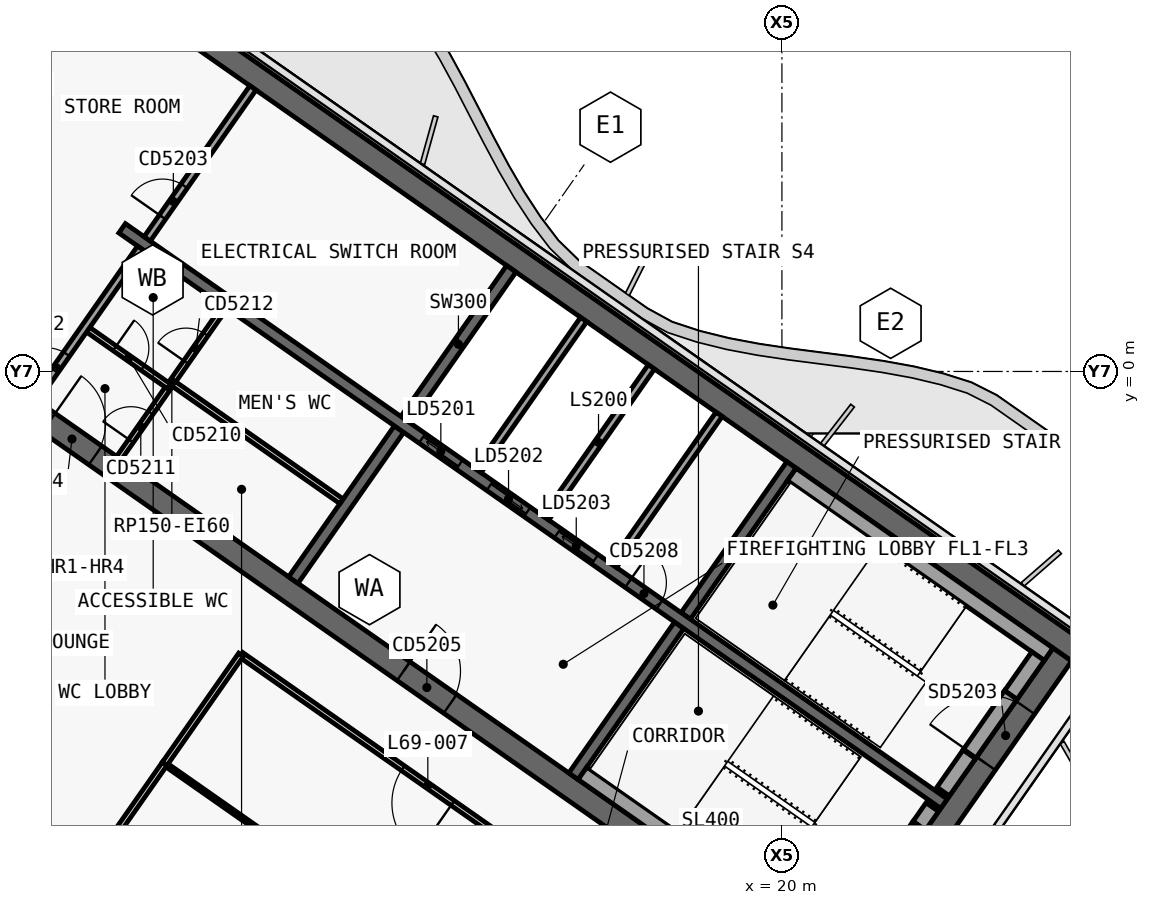
"""IFC4 building model, lengths in metres.
Left out: names, types, materials, properties, quantities, classifications, styles, units other than length and angle.
Written with IfcOpenShell. Run it as: python <this file> out.ifc"""

import sys

from ifc_helpers import new_model, si_unit, direction, frame, frame_2d, origin, place, context, subcontext, project, spatial, polyline, rectangle, outline, extrude, element, fill, save


model = new_model("IFC4")
c1 = context("Model", 3, precision=1e-05, world=origin(), true_north=direction((0.0, 1.0)))
c2 = subcontext(c1, "Body", "Model", "MODEL_VIEW")
j1 = project(units=[si_unit("LENGTHUNIT", "METRE"), si_unit("PLANEANGLEUNIT", "RADIAN")], contexts=[c1])
p1 = place(None, origin())
s1 = spatial("IfcSite", under=j1, at=p1, CompositionType="ELEMENT")
p2 = place(p1, origin())
s2 = spatial("IfcBuilding", under=s1, at=p2, CompositionType="ELEMENT")
p3 = place(p2, frame((0.0, 0.0, 291.7)))
s3 = spatial("IfcBuildingStorey", under=s2, at=p3, CompositionType="ELEMENT", Elevation=291.7)
p4 = place(p3, frame((0.028, 12.066, 0.0), z_axis=(0.0, 0.0, 1.0), x_axis=(0.819151382952, -0.573577380837, 0.0)))
e1 = element("IfcWall", 1, at=p4, inside=s3, PredefinedType="SHEAR", context=c2, shape_type="SweptSolid", body=[
    extrude(outline(polyline([(33.898, 0.3), (0.0, 0.3), (0.42, -0.3), (33.898, -0.3), (33.898, 0.3)])), origin(), (0.0, 0.0, 1.0), 3.9),
])
p5 = place(p3, frame((0.028, -0.874, 0.0), z_axis=(0.0, 0.0, 1.0), x_axis=(0.819150035022, -0.573579305871, 0.0)))
e2 = element("IfcWall", 2, at=p5, inside=s3, PredefinedType="SHEAR", context=c2, shape_type="SweptSolid", body=[
    extrude(outline(polyline([(26.476, 0.3), (0.0, 0.3), (0.42, -0.3), (26.476, -0.3), (26.476, 0.3)])), origin(), (0.0, 0.0, 1.0), 3.9),
])
p6 = place(p5, frame((0.826, 0.0, 0.0)))
e3 = element("IfcOpeningElement", 3, at=p6, cuts=e2, PredefinedType="OPENING", context=c2, shape_type="SweptSolid", body=[
    extrude(rectangle(XDim=1.5, YDim=2.1, at=frame_2d((0.75, 1.05))), frame((0.0, 0.31, 0.0), z_axis=(0.0, -1.0, 0.0), x_axis=(1.0, 0.0, 0.0)), (0.0, 0.0, 1.0), 0.62),
])
p7 = place(p5, frame((12.226, 0.0, 0.0)))
e4 = element("IfcOpeningElement", 4, at=p7, cuts=e2, PredefinedType="OPENING", context=c2, shape_type="SweptSolid", body=[
    extrude(rectangle(XDim=1.5, YDim=2.1, at=frame_2d((0.75, 1.05))), frame((0.0, 0.31, 0.0), z_axis=(0.0, -1.0, 0.0), x_axis=(1.0, 0.0, 0.0)), (0.0, 0.0, 1.0), 0.62),
])
p8 = place(p3, frame((21.642, -15.642, 0.0), z_axis=(0.0, 0.0, 1.0), x_axis=(0.573586866468, 0.819144740944, 0.0)))
e5 = element("IfcWall", 5, at=p8, inside=s3, PredefinedType="SHEAR", context=c2, shape_type="SweptSolid", body=[
    extrude(outline(polyline([(10.0, 0.3), (0.0, 0.3), (0.0, -0.3), (10.0, -0.3), (10.0, 0.3)])), origin(), (0.0, 0.0, 1.0), 3.9),
])
p9 = place(p8, frame((6.5, 0.0, 0.0)))
e6 = element("IfcOpeningElement", 6, at=p9, cuts=e5, PredefinedType="OPENING", context=c2, shape_type="SweptSolid", body=[
    extrude(rectangle(XDim=1.8, YDim=2.1, at=frame_2d((0.9, 1.05))), frame((0.0, 0.31, 0.0), z_axis=(0.0, -1.0, 0.0), x_axis=(1.0, 0.0, 0.0)), (0.0, 0.0, 1.0), 0.62),
])
p10 = place(p8, frame((2.3, 0.0, 0.0)))
e7 = element("IfcOpeningElement", 7, at=p10, cuts=e5, PredefinedType="OPENING", context=c2, shape_type="SweptSolid", body=[
    extrude(rectangle(XDim=1.8, YDim=2.1, at=frame_2d((0.9, 1.05))), frame((0.0, 0.31, 0.0), z_axis=(0.0, -1.0, 0.0), x_axis=(1.0, 0.0, 0.0)), (0.0, 0.0, 1.0), 0.62),
])
p11 = place(p3, frame((7.143, -5.49, 0.0), z_axis=(0.0, 0.0, 1.0), x_axis=(0.573617744349, 0.819123118565, 0.0)))
e8 = element("IfcWall", 8, at=p11, inside=s3, PredefinedType="SHEAR", context=c2, shape_type="SweptSolid", body=[
    extrude(outline(polyline([(0.0, 0.15), (0.0, -0.15), (4.85, -0.15), (4.85, 0.15), (0.0, 0.15)])), origin(), (0.0, 0.0, 1.0), 3.9),
])
p12 = place(p3, frame((10.097, -1.271, 0.0), z_axis=(0.0, 0.0, 1.0), x_axis=(0.573560315113, 0.819163332265, 0.0)))
e9 = element("IfcWall", 9, at=p12, inside=s3, PredefinedType="SHEAR", context=c2, shape_type="SweptSolid", body=[
    extrude(outline(polyline([(4.85, -0.15), (4.85, 0.15), (0.0, 0.15), (0.0, -0.15), (4.85, -0.15)])), origin(), (0.0, 0.0, 1.0), 3.9),
])
p13 = place(p3, frame((14.515, -10.652, 0.0), z_axis=(0.0, 0.0, 1.0), x_axis=(0.573560315113, 0.819163332265, 0.0)))
e10 = element("IfcWall", 10, at=p13, inside=s3, PredefinedType="SHEAR", context=c2, shape_type="SweptSolid", body=[
    extrude(outline(polyline([(0.0, 0.15), (0.0, -0.15), (4.85, -0.15), (4.85, 0.15), (0.0, 0.15)])), origin(), (0.0, 0.0, 1.0), 3.9),
])
p14 = place(p3, frame((17.469, -6.433, 0.0), z_axis=(0.0, 0.0, 1.0), x_axis=(0.573594092424, 0.81913968109, 0.0)))
e11 = element("IfcWall", 11, at=p14, inside=s3, PredefinedType="SHEAR", context=c2, shape_type="SweptSolid", body=[
    extrude(outline(polyline([(4.85, -0.15), (4.85, 0.15), (0.0, 0.15), (0.0, -0.15), (4.85, -0.15)])), origin(), (0.0, 0.0, 1.0), 3.9),
])
p15 = place(p3, frame((2.638, 3.768, 0.0), z_axis=(0.0, 0.0, 1.0), x_axis=(0.819155014212, -0.573572194837, 0.0)))
e12 = element("IfcWall", 12, at=p15, inside=s3, PredefinedType="SHEAR", context=c2, shape_type="SweptSolid", body=[
    extrude(outline(polyline([(0.0, 0.15), (0.0, -0.15), (26.4, -0.15), (26.4, 0.15), (0.0, 0.15)])), origin(), (0.0, 0.0, 1.0), 3.9),
])
p16 = place(p15, frame((9.637, 0.0, 0.0)))
e13 = element("IfcOpeningElement", 13, at=p16, cuts=e12, PredefinedType="OPENING", context=c2, shape_type="SweptSolid", body=[
    extrude(rectangle(XDim=1.2, YDim=2.1, at=frame_2d((0.6, 1.05))), frame((0.0, 0.16, 0.0), z_axis=(0.0, -1.0, 0.0), x_axis=(1.0, 0.0, 0.0)), (0.0, 0.0, 1.0), 0.32),
])
p17 = place(p15, frame((11.812, 0.0, 0.0)))
e14 = element("IfcOpeningElement", 14, at=p17, cuts=e12, PredefinedType="OPENING", context=c2, shape_type="SweptSolid", body=[
    extrude(rectangle(XDim=1.2, YDim=2.1, at=frame_2d((0.6, 1.05))), frame((0.0, 0.16, 0.0), z_axis=(0.0, -1.0, 0.0), x_axis=(1.0, 0.0, 0.0)), (0.0, 0.0, 1.0), 0.32),
])
p18 = place(p15, frame((13.988, 0.0, 0.0)))
e15 = element("IfcOpeningElement", 15, at=p18, cuts=e12, PredefinedType="OPENING", context=c2, shape_type="SweptSolid", body=[
    extrude(rectangle(XDim=1.2, YDim=2.1, at=frame_2d((0.6, 1.05))), frame((0.0, 0.16, 0.0), z_axis=(0.0, -1.0, 0.0), x_axis=(1.0, 0.0, 0.0)), (0.0, 0.0, 1.0), 0.32),
])
p19 = place(p15, frame((16.262, 0.0, 0.0)))
e16 = element("IfcOpeningElement", 16, at=p19, cuts=e12, PredefinedType="OPENING", context=c2, shape_type="SweptSolid", body=[
    extrude(rectangle(XDim=1.0, YDim=2.1, at=frame_2d((0.5, 1.05))), frame((0.0, 0.16, 0.0), z_axis=(0.0, -1.0, 0.0), x_axis=(1.0, 0.0, 0.0)), (0.0, 0.0, 1.0), 0.32),
])
p20 = place(p3, frame((12.001, -2.605, 0.0), z_axis=(0.0, 0.0, 1.0), x_axis=(0.573560315113, 0.819163332265, 0.0)))
e17 = element("IfcWall", 17, at=p20, inside=s3, PredefinedType="SOLIDWALL", context=c2, shape_type="SweptSolid", body=[
    extrude(rectangle(XDim=4.85, YDim=0.2, at=frame_2d((2.425, 0.0))), origin(), (0.0, 0.0, 1.0), 3.9),
])
p21 = place(p3, frame((13.783, -3.852, 0.0), z_axis=(0.0, 0.0, 1.0), x_axis=(0.573594092424, 0.81913968109, 0.0)))
e18 = element("IfcWall", 18, at=p21, inside=s3, PredefinedType="SOLIDWALL", context=c2, shape_type="SweptSolid", body=[
    extrude(rectangle(XDim=4.85, YDim=0.2, at=frame_2d((2.425, 0.0))), origin(), (0.0, 0.0, 1.0), 3.9),
])
p22 = place(p3, frame((15.565, -5.1, 0.0), z_axis=(0.0, 0.0, 1.0), x_axis=(0.573560315113, 0.819163332265, 0.0)))
e19 = element("IfcWall", 19, at=p22, inside=s3, PredefinedType="SOLIDWALL", context=c2, shape_type="SweptSolid", body=[
    extrude(rectangle(XDim=4.85, YDim=0.2, at=frame_2d((2.425, 0.0))), origin(), (0.0, 0.0, 1.0), 3.9),
])
p23 = place(p3, frame((2.556, -2.278, 0.0), z_axis=(0.0, 0.0, 1.0), x_axis=(0.573560315113, 0.819163332265, 0.0)))
e20 = element("IfcWall", 20, at=p23, inside=s3, PredefinedType="PARTITIONING", context=c2, shape_type="SweptSolid", body=[
    extrude(rectangle(XDim=4.85, YDim=0.15, at=frame_2d((2.425, 0.0))), origin(), (0.0, 0.0, 1.0), 3.62),
])
p24 = place(p23, frame((0.55, 0.0, 0.0)))
e21 = element("IfcOpeningElement", 21, at=p24, cuts=e20, PredefinedType="OPENING", context=c2, shape_type="SweptSolid", body=[
    extrude(rectangle(XDim=0.9, YDim=2.1, at=frame_2d((0.45, 1.05))), frame((0.0, 0.085, 0.0), z_axis=(0.0, -1.0, 0.0), x_axis=(1.0, 0.0, 0.0)), (0.0, 0.0, 1.0), 0.17),
])
p25 = place(p23, frame((3.075, 0.0, 0.0)))
e22 = element("IfcOpeningElement", 22, at=p25, cuts=e20, PredefinedType="OPENING", context=c2, shape_type="SweptSolid", body=[
    extrude(rectangle(XDim=0.9, YDim=2.1, at=frame_2d((0.45, 1.05))), frame((0.0, 0.085, 0.0), z_axis=(0.0, -1.0, 0.0), x_axis=(1.0, 0.0, 0.0)), (0.0, 0.0, 1.0), 0.17),
])
p26 = place(p3, frame((1.745, 1.097, 0.0), z_axis=(0.0, 0.0, 1.0), x_axis=(0.819178980414, -0.573537965655, 0.0)))
e23 = element("IfcWall", 23, at=p26, inside=s3, PredefinedType="PARTITIONING", context=c2, shape_type="SweptSolid", body=[
    extrude(rectangle(XDim=2.6, YDim=0.15, at=frame_2d((1.3, 0.0))), origin(), (0.0, 0.0, 1.0), 3.62),
])
p27 = place(p26, frame((0.85, 0.0, 0.0)))
e24 = element("IfcOpeningElement", 24, at=p27, cuts=e23, PredefinedType="OPENING", context=c2, shape_type="SweptSolid", body=[
    extrude(rectangle(XDim=0.9, YDim=2.1, at=frame_2d((0.45, 1.05))), frame((0.0, 0.085, 0.0), z_axis=(0.0, -1.0, 0.0), x_axis=(1.0, 0.0, 0.0)), (0.0, 0.0, 1.0), 0.17),
])
p28 = place(p3, frame((3.947, -0.292, 0.0), z_axis=(0.0, 0.0, 1.0), x_axis=(0.819151939971, -0.573576585332, 0.0)))
e25 = element("IfcWall", 25, at=p28, inside=s3, PredefinedType="PARTITIONING", context=c2, shape_type="SweptSolid", body=[
    extrude(rectangle(XDim=5.45, YDim=0.15, at=frame_2d((2.725, 0.0))), origin(), (0.0, 0.0, 1.0), 3.62),
])
p29 = place(p3, frame((20.259, -2.71, 0.0), z_axis=(0.0, 0.0, 1.0), x_axis=(0.81914849389, -0.573581506813, 0.0)))
e26 = element("IfcWall", 26, at=p29, inside=s3, PredefinedType="SOLIDWALL", context=c2, shape_type="SweptSolid", body=[
    extrude(rectangle(XDim=8.25, YDim=0.4, at=frame_2d((4.125, 0.0))), origin(), (0.0, 0.0, 1.0), 3.62),
])
p30 = place(p3, frame((24.244, -11.055, 0.0), z_axis=(0.0, 0.0, 1.0), x_axis=(0.573571582932, 0.819155442668, 0.0)))
e27 = element("IfcWall", 27, at=p30, inside=s3, PredefinedType="SOLIDWALL", context=c2, shape_type="SweptSolid", body=[
    extrude(rectangle(XDim=1.2, YDim=0.4, at=frame_2d((0.6, 0.0))), origin(), (0.0, 0.0, 1.0), 3.62),
])
p31 = place(p3, frame((26.022, -8.515, 0.0), z_axis=(0.0, 0.0, 1.0), x_axis=(0.573619628835, 0.819121798889, 0.0)))
e28 = element("IfcWall", 28, at=p31, inside=s3, PredefinedType="SOLIDWALL", context=c2, shape_type="SweptSolid", body=[
    extrude(rectangle(XDim=1.25, YDim=0.4, at=frame_2d((0.625, 0.0))), origin(), (0.0, 0.0, 1.0), 3.62),
])
p32 = place(p3, frame((24.932, -10.072, 2.15), z_axis=(0.0, 0.0, 1.0), x_axis=(0.573591692345, 0.819141361715, 0.0)))
e29 = element("IfcWall", 29, at=p32, inside=s3, PredefinedType="SOLIDWALL", context=c2, shape_type="SweptSolid", body=[
    extrude(rectangle(XDim=1.9, YDim=0.4, at=frame_2d((0.95, 0.0))), origin(), (0.0, 0.0, 1.0), 1.47),
])
p33 = place(p3, frame((14.753, -10.574, 0.0), z_axis=(0.0, 0.0, 1.0), x_axis=(0.819158229677, -0.573567602601, 0.0)))
e30 = element("IfcWall", 30, at=p33, inside=s3, PredefinedType="SOLIDWALL", context=c2, shape_type="SweptSolid", body=[
    extrude(rectangle(XDim=8.25, YDim=0.4, at=frame_2d((4.125, 0.0))), origin(), (0.0, 0.0, 1.0), 3.62),
])
p34 = place(p3, frame((23.613, -11.956, 0.0), z_axis=(0.0, 0.0, 1.0), x_axis=(0.573435029941, 0.819251039936, 0.0)))
e31 = element("IfcWall", 31, at=p34, inside=s3, PredefinedType="SOLIDWALL", context=c2, shape_type="SweptSolid", body=[
    extrude(rectangle(XDim=0.6, YDim=0.4, at=frame_2d((0.3, 0.0))), origin(), (0.0, 0.0, 1.0), 3.62),
])
p35 = place(p3, frame((22.523, -13.512, 2.15), z_axis=(0.0, 0.0, 1.0), x_axis=(0.573591692345, 0.819141361715, 0.0)))
e32 = element("IfcWall", 32, at=p35, inside=s3, PredefinedType="SOLIDWALL", context=c2, shape_type="SweptSolid", body=[
    extrude(rectangle(XDim=1.9, YDim=0.4, at=frame_2d((0.95, 0.0))), origin(), (0.0, 0.0, 1.0), 1.47),
])
p36 = place(p3, frame((0.344, -0.729, 0.0), z_axis=(0.0, 0.0, 1.0), x_axis=(0.573560315113, 0.819163332265, 0.0)))
e33 = element("IfcWall", 33, at=p36, inside=s3, PredefinedType="SOLIDWALL", context=c2, shape_type="SweptSolid", body=[
    extrude(rectangle(XDim=4.85, YDim=0.2, at=frame_2d((2.425, 0.0))), origin(), (0.0, 0.0, 1.0), 3.62),
])
p37 = place(p36, frame((0.55, 0.0, 0.0)))
e34 = element("IfcOpeningElement", 34, at=p37, cuts=e33, PredefinedType="OPENING", context=c2, shape_type="SweptSolid", body=[
    extrude(rectangle(XDim=0.9, YDim=2.1, at=frame_2d((0.45, 1.05))), frame((0.0, 0.11, 0.0), z_axis=(0.0, -1.0, 0.0), x_axis=(1.0, 0.0, 0.0)), (0.0, 0.0, 1.0), 0.22),
])
p38 = place(p3, frame((3.298, 3.49, 0.0), z_axis=(0.0, 0.0, 1.0), x_axis=(0.573560315113, 0.819163332265, 0.0)))
e35 = element("IfcWall", 35, at=p38, inside=s3, PredefinedType="SOLIDWALL", context=c2, shape_type="SweptSolid", body=[
    extrude(rectangle(XDim=4.85, YDim=0.2, at=frame_2d((2.425, 0.0))), origin(), (0.0, 0.0, 1.0), 3.62),
])
p39 = place(p38, frame((0.7, 0.0, 0.0)))
e36 = element("IfcOpeningElement", 36, at=p39, cuts=e35, PredefinedType="OPENING", context=c2, shape_type="SweptSolid", body=[
    extrude(rectangle(XDim=1.0, YDim=2.1, at=frame_2d((0.5, 1.05))), frame((0.0, 0.11, 0.0), z_axis=(0.0, -1.0, 0.0), x_axis=(1.0, 0.0, 0.0)), (0.0, 0.0, 1.0), 0.22),
])
p40 = place(p3, frame((15.598, -14.34, 0.0), z_axis=(0.0, 0.0, 1.0), x_axis=(-0.81915546166, 0.573571555809, 0.0)))
e37 = element("IfcWall", 37, at=p40, inside=s3, PredefinedType="PARTITIONING", context=c2, shape_type="SweptSolid", body=[
    extrude(rectangle(XDim=12.002, YDim=0.15, at=frame_2d((6.001, 0.0))), origin(), (0.0, 0.0, 1.0), 3.05),
])
p41 = place(p40, frame((5.201, 0.0, 0.0)))
e38 = element("IfcOpeningElement", 38, at=p41, cuts=e37, PredefinedType="OPENING", context=c2, shape_type="SweptSolid", body=[
    extrude(rectangle(XDim=1.6, YDim=2.1, at=frame_2d((0.8, 1.05))), frame((0.0, 0.085, 0.0), z_axis=(0.0, -1.0, 0.0), x_axis=(1.0, 0.0, 0.0)), (0.0, 0.0, 1.0), 0.17),
])
p42 = place(p3, frame((13.588, -17.207, 0.0), z_axis=(0.0, 0.0, 1.0), x_axis=(-0.819156404271, 0.573570209602, 0.0)))
e39 = element("IfcWall", 39, at=p42, inside=s3, PredefinedType="PARTITIONING", context=c2, shape_type="SweptSolid", body=[
    extrude(rectangle(XDim=12.0, YDim=0.1, at=frame_2d((6.0, 0.0))), origin(), (0.0, 0.0, 1.0), 3.05),
])
p43 = place(p42, frame((5.55, 0.0, 0.0)))
e40 = element("IfcOpeningElement", 40, at=p43, cuts=e39, PredefinedType="OPENING", context=c2, shape_type="SweptSolid", body=[
    extrude(rectangle(XDim=0.9, YDim=2.1, at=frame_2d((0.45, 1.05))), frame((0.0, 0.06, 0.0), z_axis=(0.0, -1.0, 0.0), x_axis=(1.0, 0.0, 0.0)), (0.0, 0.0, 1.0), 0.12),
])
p44 = place(p3, frame((1.849, -13.051, 0.0), z_axis=(0.0, 0.0, 1.0), x_axis=(0.573595235521, 0.819138880647, 0.0)))
e41 = element("IfcWall", 41, at=p44, inside=s3, PredefinedType="PARTITIONING", context=c2, shape_type="SweptSolid", body=[
    extrude(rectangle(XDim=3.329, YDim=0.15, at=frame_2d((1.665, 0.0))), origin(), (0.0, 0.0, 1.0), 3.05),
])
p45 = place(p3, frame((3.759, -10.323, 0.0), z_axis=(0.0, 0.0, 1.0), x_axis=(0.573598101901, 0.81913687348, 0.0)))
e42 = element("IfcWall", 42, at=p45, inside=s3, PredefinedType="PARTITIONING", context=c2, shape_type="SweptSolid", body=[
    extrude(rectangle(XDim=3.5, YDim=0.15, at=frame_2d((1.75, 0.0))), origin(), (0.0, 0.0, 1.0), 3.05),
])
p46 = place(p16, origin())
e43 = element("IfcDoor", 43, at=p46, inside=s3, OperationType="SLIDING_TO_LEFT", PredefinedType="DOOR", context=c2, shape_type="SweptSolid", body=[
    extrude(rectangle(XDim=1.2, YDim=2.1, at=frame_2d((0.6, 1.05))), frame((0.0, 0.025, 0.0), z_axis=(0.0, -1.0, 0.0), x_axis=(1.0, 0.0, 0.0)), (0.0, 0.0, 1.0), 0.05),
])
fill(e13, e43)
p47 = place(p17, origin())
e44 = element("IfcDoor", 44, at=p47, inside=s3, OperationType="SLIDING_TO_RIGHT", PredefinedType="DOOR", context=c2, shape_type="SweptSolid", body=[
    extrude(rectangle(XDim=1.2, YDim=2.1, at=frame_2d((0.6, 1.05))), frame((0.0, 0.025, 0.0), z_axis=(0.0, -1.0, 0.0), x_axis=(1.0, 0.0, 0.0)), (0.0, 0.0, 1.0), 0.05),
])
fill(e14, e44)
p48 = place(p18, origin())
e45 = element("IfcDoor", 45, at=p48, inside=s3, OperationType="SLIDING_TO_LEFT", PredefinedType="DOOR", context=c2, shape_type="SweptSolid", body=[
    extrude(rectangle(XDim=1.2, YDim=2.1, at=frame_2d((0.6, 1.05))), frame((0.0, 0.025, 0.0), z_axis=(0.0, -1.0, 0.0), x_axis=(1.0, 0.0, 0.0)), (0.0, 0.0, 1.0), 0.05),
])
fill(e15, e45)
p49 = place(p19, origin())
e46 = element("IfcDoor", 46, at=p49, inside=s3, OperationType="SINGLE_SWING_RIGHT", PredefinedType="DOOR", context=c2, shape_type="SweptSolid", body=[
    extrude(rectangle(XDim=1.0, YDim=2.1, at=frame_2d((0.5, 1.05))), frame((0.0, 0.025, 0.0), z_axis=(0.0, -1.0, 0.0), x_axis=(1.0, 0.0, 0.0)), (0.0, 0.0, 1.0), 0.05),
])
fill(e16, e46)
p50 = place(p24, origin())
e47 = element("IfcDoor", 47, at=p50, inside=s3, OperationType="SINGLE_SWING_RIGHT", PredefinedType="DOOR", context=c2, shape_type="SweptSolid", body=[
    extrude(rectangle(XDim=0.9, YDim=2.1, at=frame_2d((0.45, 1.05))), frame((0.0, 0.025, 0.0), z_axis=(0.0, -1.0, 0.0), x_axis=(1.0, 0.0, 0.0)), (0.0, 0.0, 1.0), 0.05),
])
fill(e21, e47)
p51 = place(p27, origin())
e48 = element("IfcDoor", 48, at=p51, inside=s3, OperationType="SINGLE_SWING_RIGHT", PredefinedType="DOOR", context=c2, shape_type="SweptSolid", body=[
    extrude(rectangle(XDim=0.9, YDim=2.1, at=frame_2d((0.45, 1.05))), frame((0.0, 0.025, 0.0), z_axis=(0.0, -1.0, 0.0), x_axis=(1.0, 0.0, 0.0)), (0.0, 0.0, 1.0), 0.05),
])
fill(e24, e48)
p52 = place(p25, origin())
e49 = element("IfcDoor", 49, at=p52, inside=s3, OperationType="SINGLE_SWING_RIGHT", PredefinedType="DOOR", context=c2, shape_type="SweptSolid", body=[
    extrude(rectangle(XDim=0.9, YDim=2.1, at=frame_2d((0.45, 1.05))), frame((0.0, 0.025, 0.0), z_axis=(0.0, -1.0, 0.0), x_axis=(1.0, 0.0, 0.0)), (0.0, 0.0, 1.0), 0.05),
])
fill(e22, e49)
p53 = place(p6, origin())
e50 = element("IfcDoor", 50, at=p53, inside=s3, OperationType="SINGLE_SWING_RIGHT", PredefinedType="DOOR", context=c2, shape_type="SweptSolid", body=[
    extrude(rectangle(XDim=1.5, YDim=2.1, at=frame_2d((0.75, 1.05))), frame((0.0, 0.025, 0.0), z_axis=(0.0, -1.0, 0.0), x_axis=(1.0, 0.0, 0.0)), (0.0, 0.0, 1.0), 0.05),
])
fill(e3, e50)
p54 = place(p7, origin())
e51 = element("IfcDoor", 51, at=p54, inside=s3, OperationType="DOUBLE_DOOR_SINGLE_SWING", PredefinedType="DOOR", context=c2, shape_type="SweptSolid", body=[
    extrude(rectangle(XDim=1.5, YDim=2.1, at=frame_2d((0.75, 1.05))), frame((0.0, 0.025, 0.0), z_axis=(0.0, -1.0, 0.0), x_axis=(1.0, 0.0, 0.0)), (0.0, 0.0, 1.0), 0.05),
])
fill(e4, e51)
p55 = place(p9, origin())
e52 = element("IfcDoor", 52, at=p55, inside=s3, OperationType="DOUBLE_DOOR_SINGLE_SWING", PredefinedType="DOOR", context=c2, shape_type="SweptSolid", body=[
    extrude(rectangle(XDim=1.8, YDim=2.1, at=frame_2d((0.9, 1.05))), frame((0.0, 0.025, 0.0), z_axis=(0.0, -1.0, 0.0), x_axis=(1.0, 0.0, 0.0)), (0.0, 0.0, 1.0), 0.05),
])
fill(e6, e52)
p56 = place(p37, origin())
e53 = element("IfcDoor", 53, at=p56, inside=s3, OperationType="SINGLE_SWING_RIGHT", PredefinedType="DOOR", context=c2, shape_type="SweptSolid", body=[
    extrude(rectangle(XDim=0.9, YDim=2.1, at=frame_2d((0.45, 1.05))), frame((0.0, 0.025, 0.0), z_axis=(0.0, -1.0, 0.0), x_axis=(1.0, 0.0, 0.0)), (0.0, 0.0, 1.0), 0.05),
])
fill(e34, e53)
p57 = place(p39, origin())
e54 = element("IfcDoor", 54, at=p57, inside=s3, OperationType="SINGLE_SWING_RIGHT", PredefinedType="DOOR", context=c2, shape_type="SweptSolid", body=[
    extrude(rectangle(XDim=1.0, YDim=2.1, at=frame_2d((0.5, 1.05))), frame((0.0, 0.025, 0.0), z_axis=(0.0, -1.0, 0.0), x_axis=(1.0, 0.0, 0.0)), (0.0, 0.0, 1.0), 0.05),
])
fill(e36, e54)
p58 = place(p41, origin())
e55 = element("IfcDoor", 55, at=p58, inside=s3, OperationType="DOUBLE_DOOR_SINGLE_SWING", PredefinedType="DOOR", context=c2, shape_type="SweptSolid", body=[
    extrude(rectangle(XDim=1.6, YDim=2.1, at=frame_2d((0.8, 1.05))), frame((0.0, 0.025, 0.0), z_axis=(0.0, -1.0, 0.0), x_axis=(1.0, 0.0, 0.0)), (0.0, 0.0, 1.0), 0.05),
])
fill(e38, e55)
save(model, sys.argv[1])
